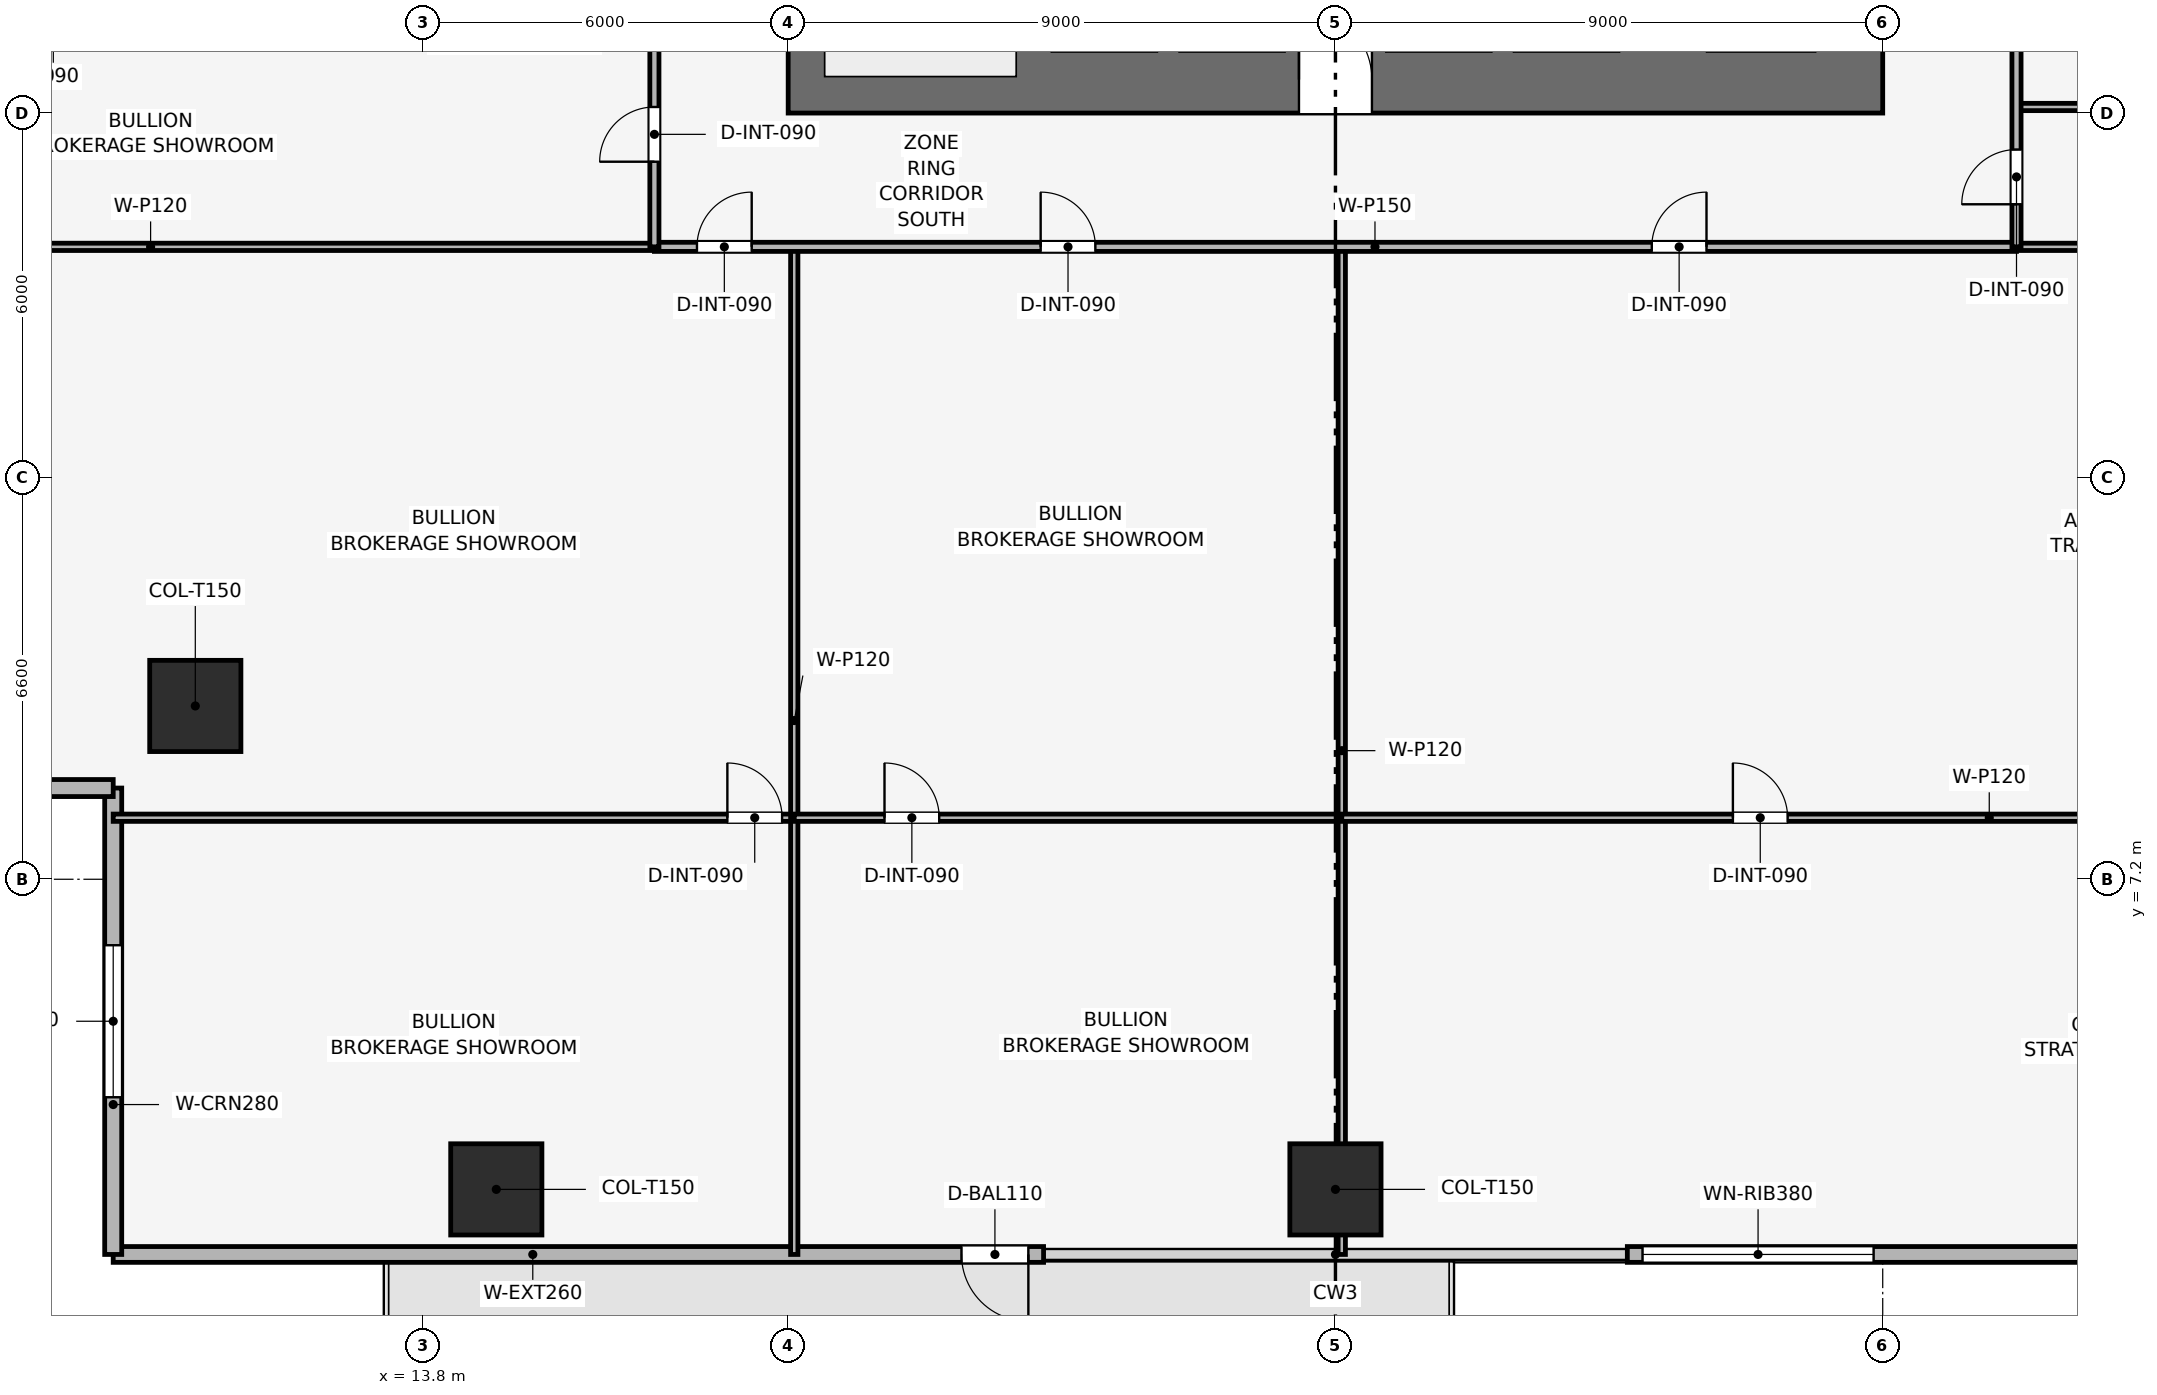
"""IFC4 building model, lengths in metres.
Left out: names, types, materials, properties, quantities, classifications, styles, units other than length and angle.
Written with IfcOpenShell. Run it as: python <this file> out.ifc"""

import sys

from ifc_helpers import new_model, si_unit, direction, frame, frame_2d, origin, origin_2d, place, context, subcontext, project, spatial, rectangle, extrude, element, fill, save


model = new_model("IFC4")
c1 = context("Model", 3, precision=1e-05, world=origin(), true_north=direction((0.0, 1.0)))
c2 = subcontext(c1, "Body", "Model", "MODEL_VIEW")
j1 = project(units=[si_unit("LENGTHUNIT", "METRE"), si_unit("PLANEANGLEUNIT", "RADIAN")], contexts=[c1])
p1 = place(None, origin())
s1 = spatial("IfcSite", under=j1, at=p1, CompositionType="ELEMENT")
p2 = place(p1, origin())
s2 = spatial("IfcBuilding", under=s1, at=p2, CompositionType="ELEMENT")
p3 = place(p2, frame((0.0, 0.0, 76.8)))
s3 = spatial("IfcBuildingStorey", under=s2, at=p3, CompositionType="ELEMENT", Elevation=76.8)
p4 = place(p3, frame((19.8, 20.35, 0.0), z_axis=(0.0, 0.0, 1.0), x_axis=(1.0, 0.0, 0.0)))
e1 = element("IfcWall", 1, at=p4, inside=s3, PredefinedType="SHEAR", context=c2, shape_type="SweptSolid", body=[
    extrude(rectangle(XDim=18.0, YDim=1.1, at=frame_2d((9.0, 0.0))), origin(), (0.0, 0.0, 1.0), 3.9),
])
p5 = place(p4, frame((8.4, 0.0, 0.0)))
e2 = element("IfcOpeningElement", 2, at=p5, cuts=e1, PredefinedType="OPENING", context=c2, shape_type="SweptSolid", body=[
    extrude(rectangle(XDim=1.2, YDim=2.2, at=frame_2d((0.6, 1.1))), frame((0.0, 0.56, 0.0), z_axis=(0.0, -1.0, 0.0), x_axis=(1.0, 0.0, 0.0)), (0.0, 0.0, 1.0), 1.12),
])
for number, where, z_axis, x_axis in (
    (3, (15.0, 2.1, 0.003), (0.0, 0.0, 1.0), (1.0, 0.0, 0.0)),
    (4, (28.8, 2.1, 0.003), (0.0, 0.0, 1.0), (1.0, 0.0, 0.0)),
    (5, (10.05, 10.05, 0.003), (0.0, 0.0, 1.0), (1.0, 0.0, 0.0)),
):
    element("IfcColumn", number, at=place(p3, frame(where, z_axis=z_axis, x_axis=x_axis)), inside=s3, PredefinedType="COLUMN", context=c2, shape_type="SweptSolid", body=[
        extrude(rectangle(XDim=1.5, YDim=1.5, at=origin_2d()), origin(), (0.0, 0.0, 1.0), 3.644),
    ])
p6 = place(p3, frame((48.9, 1.03, 0.0), z_axis=(0.0, 0.0, 1.0), x_axis=(-1.0, 0.0, 0.0)))
e6 = element("IfcWall", 6, at=p6, inside=s3, PredefinedType="SOLIDWALL", context=c2, shape_type="SweptSolid", body=[
    extrude(rectangle(XDim=15.3, YDim=0.26, at=frame_2d((7.65, 0.0))), origin(), (0.0, 0.0, 1.0), 3.65),
])
p7 = place(p6, frame((11.25, 0.0, 0.9)))
e7 = element("IfcOpeningElement", 7, at=p7, cuts=e6, PredefinedType="OPENING", context=c2, shape_type="SweptSolid", body=[
    extrude(rectangle(XDim=3.8, YDim=1.9, at=frame_2d((1.9, 0.95))), frame((0.0, 0.14, 0.0), z_axis=(0.0, -1.0, 0.0), x_axis=(1.0, 0.0, 0.0)), (0.0, 0.0, 1.0), 0.28),
])
p8 = place(p3, frame((24.0, 1.03, 0.0), z_axis=(0.0, 0.0, 1.0), x_axis=(-1.0, 0.0, 0.0)))
e8 = element("IfcWall", 8, at=p8, inside=s3, PredefinedType="SOLIDWALL", context=c2, shape_type="SweptSolid", body=[
    extrude(rectangle(XDim=15.3, YDim=0.26, at=frame_2d((7.65, 0.0))), origin(), (0.0, 0.0, 1.0), 3.65),
])
p9 = place(p8, frame((0.25, 0.0, 0.0)))
e9 = element("IfcOpeningElement", 9, at=p9, cuts=e8, PredefinedType="OPENING", context=c2, shape_type="SweptSolid", body=[
    extrude(rectangle(XDim=1.1, YDim=2.2, at=frame_2d((0.55, 1.1))), frame((0.0, 0.14, 0.0), z_axis=(0.0, -1.0, 0.0), x_axis=(1.0, 0.0, 0.0)), (0.0, 0.0, 1.0), 0.28),
])
p10 = place(p3, frame((8.7, 1.03, 0.0), z_axis=(0.0, 0.0, 1.0), x_axis=(0.0, 1.0, 0.0)))
e10 = element("IfcWall", 10, at=p10, inside=s3, PredefinedType="SOLIDWALL", context=c2, shape_type="SweptSolid", body=[
    extrude(rectangle(XDim=7.67, YDim=0.28, at=frame_2d((3.835, 0.0))), origin(), (0.0, 0.0, 1.0), 3.65),
])
p11 = place(p10, frame((2.585, 0.0, 0.9)))
e11 = element("IfcOpeningElement", 11, at=p11, cuts=e10, PredefinedType="OPENING", context=c2, shape_type="SweptSolid", body=[
    extrude(rectangle(XDim=2.5, YDim=1.9, at=frame_2d((1.25, 0.95))), frame((0.0, 0.15, 0.0), z_axis=(0.0, -1.0, 0.0), x_axis=(1.0, 0.0, 0.0)), (0.0, 0.0, 1.0), 0.3),
])
p12 = place(p3, frame((8.7, 8.7, 0.0), z_axis=(0.0, 0.0, 1.0), x_axis=(-1.0, 0.0, 0.0)))
e12 = element("IfcWall", 12, at=p12, inside=s3, PredefinedType="SOLIDWALL", context=c2, shape_type="SweptSolid", body=[
    extrude(rectangle(XDim=7.67, YDim=0.28, at=frame_2d((3.835, 0.0))), origin(), (0.0, 0.0, 1.0), 3.65),
])
p13 = place(p12, frame((2.585, 0.0, 0.9)))
e13 = element("IfcOpeningElement", 13, at=p13, cuts=e12, PredefinedType="OPENING", context=c2, shape_type="SweptSolid", body=[
    extrude(rectangle(XDim=2.5, YDim=1.9, at=frame_2d((1.25, 0.95))), frame((0.0, 0.15, 0.0), z_axis=(0.0, -1.0, 0.0), x_axis=(1.0, 0.0, 0.0)), (0.0, 0.0, 1.0), 0.3),
])
p14 = place(p3, frame((8.7, 8.212, 0.0), z_axis=(0.0, 0.0, 1.0), x_axis=(1.0, 0.0, 0.0)))
e14 = element("IfcWall", 14, at=p14, inside=s3, PredefinedType="PARTITIONING", context=c2, shape_type="SweptSolid", body=[
    extrude(rectangle(XDim=11.2, YDim=0.12, at=frame_2d((5.6, 0.0))), origin(), (0.0, 0.0, 1.0), 2.935),
])
p15 = place(p14, frame((10.1, 0.0, 0.0)))
e15 = element("IfcOpeningElement", 15, at=p15, cuts=e14, PredefinedType="OPENING", context=c2, shape_type="SweptSolid", body=[
    extrude(rectangle(XDim=0.9, YDim=2.1, at=frame_2d((0.45, 1.05))), frame((0.0, 0.07, 0.0), z_axis=(0.0, -1.0, 0.0), x_axis=(1.0, 0.0, 0.0)), (0.0, 0.0, 1.0), 0.14),
])
p16 = place(p3, frame((19.9, 1.03, 0.0), z_axis=(0.0, 0.0, 1.0), x_axis=(0.0, 1.0, 0.0)))
e16 = element("IfcWall", 16, at=p16, inside=s3, PredefinedType="PARTITIONING", context=c2, shape_type="SweptSolid", body=[
    extrude(rectangle(XDim=16.57, YDim=0.12, at=frame_2d((8.285, 0.0))), origin(), (0.0, 0.0, 1.0), 2.935),
])
p17 = place(p3, frame((19.9, 8.212, 0.0), z_axis=(0.0, 0.0, 1.0), x_axis=(1.0, 0.0, 0.0)))
e17 = element("IfcWall", 17, at=p17, inside=s3, PredefinedType="PARTITIONING", context=c2, shape_type="SweptSolid", body=[
    extrude(rectangle(XDim=9.004, YDim=0.12, at=frame_2d((4.502, 0.0))), origin(), (0.0, 0.0, 1.0), 3.085),
])
p18 = place(p17, frame((1.484, 0.0, 0.0)))
e18 = element("IfcOpeningElement", 18, at=p18, cuts=e17, PredefinedType="OPENING", context=c2, shape_type="SweptSolid", body=[
    extrude(rectangle(XDim=0.9, YDim=2.1, at=frame_2d((0.45, 1.05))), frame((0.0, 0.07, 0.0), z_axis=(0.0, -1.0, 0.0), x_axis=(1.0, 0.0, 0.0)), (0.0, 0.0, 1.0), 0.14),
])
p19 = place(p3, frame((28.904, 1.03, 0.0), z_axis=(0.0, 0.0, 1.0), x_axis=(0.0, 1.0, 0.0)))
e19 = element("IfcWall", 19, at=p19, inside=s3, PredefinedType="PARTITIONING", context=c2, shape_type="SweptSolid", body=[
    extrude(rectangle(XDim=16.57, YDim=0.12, at=frame_2d((8.285, 0.0))), origin(), (0.0, 0.0, 1.0), 3.085),
])
p20 = place(p3, frame((28.904, 8.212, 0.0), z_axis=(0.0, 0.0, 1.0), x_axis=(1.0, 0.0, 0.0)))
e20 = element("IfcWall", 20, at=p20, inside=s3, PredefinedType="PARTITIONING", context=c2, shape_type="SweptSolid", body=[
    extrude(rectangle(XDim=19.996, YDim=0.12, at=frame_2d((9.998, 0.0))), origin(), (0.0, 0.0, 1.0), 2.935),
])
p21 = place(p20, frame((6.432, 0.0, 0.0)))
e21 = element("IfcOpeningElement", 21, at=p21, cuts=e20, PredefinedType="OPENING", context=c2, shape_type="SweptSolid", body=[
    extrude(rectangle(XDim=0.9, YDim=2.1, at=frame_2d((0.45, 1.05))), frame((0.0, 0.07, 0.0), z_axis=(0.0, -1.0, 0.0), x_axis=(1.0, 0.0, 0.0)), (0.0, 0.0, 1.0), 0.14),
])
for number, where, z_axis, x_axis in (
    (22, (1.03, 17.6, 0.0), (0.0, 0.0, 1.0), (1.0, 0.0, 0.0)),
    (23, (40.0, 17.6, 0.0), (0.0, 0.0, 1.0), (1.0, 0.0, 0.0)),
    (24, (40.0, 19.9, 0.0), (0.0, 0.0, 1.0), (1.0, 0.0, 0.0)),
):
    element("IfcWall", number, at=place(p3, frame(where, z_axis=z_axis, x_axis=x_axis)), inside=s3, PredefinedType="PARTITIONING", context=c2, shape_type="SweptSolid", body=[
        extrude(rectangle(XDim=16.57, YDim=0.12, at=frame_2d((8.285, 0.0))), origin(), (0.0, 0.0, 1.0), 2.935),
    ])
p22 = place(p3, frame((17.6, 17.6, 0.0), z_axis=(0.0, 0.0, 1.0), x_axis=(1.0, 0.0, 0.0)))
e25 = element("IfcWall", 25, at=p22, inside=s3, PredefinedType="PARTITIONING", context=c2, shape_type="SweptSolid", body=[
    extrude(rectangle(XDim=22.4, YDim=0.15, at=frame_2d((11.2, 0.0))), origin(), (0.0, 0.0, 1.0), 3.085),
])
p23 = place(p22, frame((0.7, 0.0, 0.0)))
e26 = element("IfcOpeningElement", 26, at=p23, cuts=e25, PredefinedType="OPENING", context=c2, shape_type="SweptSolid", body=[
    extrude(rectangle(XDim=0.9, YDim=2.1, at=frame_2d((0.45, 1.05))), frame((0.0, 0.085, 0.0), z_axis=(0.0, -1.0, 0.0), x_axis=(1.0, 0.0, 0.0)), (0.0, 0.0, 1.0), 0.17),
])
p24 = place(p22, frame((6.352, 0.0, 0.0)))
e27 = element("IfcOpeningElement", 27, at=p24, cuts=e25, PredefinedType="OPENING", context=c2, shape_type="SweptSolid", body=[
    extrude(rectangle(XDim=0.9, YDim=2.1, at=frame_2d((0.45, 1.05))), frame((0.0, 0.085, 0.0), z_axis=(0.0, -1.0, 0.0), x_axis=(1.0, 0.0, 0.0)), (0.0, 0.0, 1.0), 0.17),
])
p25 = place(p22, frame((16.402, 0.0, 0.0)))
e28 = element("IfcOpeningElement", 28, at=p25, cuts=e25, PredefinedType="OPENING", context=c2, shape_type="SweptSolid", body=[
    extrude(rectangle(XDim=0.9, YDim=2.1, at=frame_2d((0.45, 1.05))), frame((0.0, 0.085, 0.0), z_axis=(0.0, -1.0, 0.0), x_axis=(1.0, 0.0, 0.0)), (0.0, 0.0, 1.0), 0.17),
])
p26 = place(p3, frame((17.6, 17.6, 0.0), z_axis=(0.0, 0.0, 1.0), x_axis=(0.0, 1.0, 0.0)))
e29 = element("IfcWall", 29, at=p26, inside=s3, PredefinedType="PARTITIONING", context=c2, shape_type="SweptSolid", body=[
    extrude(rectangle(XDim=22.4, YDim=0.15, at=frame_2d((11.2, 0.0))), origin(), (0.0, 0.0, 1.0), 3.085),
])
p27 = place(p26, frame((1.4, 0.0, 0.0)))
e30 = element("IfcOpeningElement", 30, at=p27, cuts=e29, PredefinedType="OPENING", context=c2, shape_type="SweptSolid", body=[
    extrude(rectangle(XDim=0.9, YDim=2.1, at=frame_2d((0.45, 1.05))), frame((0.0, 0.085, 0.0), z_axis=(0.0, -1.0, 0.0), x_axis=(1.0, 0.0, 0.0)), (0.0, 0.0, 1.0), 0.17),
])
p28 = place(p26, frame((4.65, 0.0, 0.0)))
e31 = element("IfcOpeningElement", 31, at=p28, cuts=e29, PredefinedType="OPENING", context=c2, shape_type="SweptSolid", body=[
    extrude(rectangle(XDim=0.9, YDim=2.1, at=frame_2d((0.45, 1.05))), frame((0.0, 0.085, 0.0), z_axis=(0.0, -1.0, 0.0), x_axis=(1.0, 0.0, 0.0)), (0.0, 0.0, 1.0), 0.17),
])
p29 = place(p26, frame((7.55, 0.0, 0.0)))
e32 = element("IfcOpeningElement", 32, at=p29, cuts=e29, PredefinedType="OPENING", context=c2, shape_type="SweptSolid", body=[
    extrude(rectangle(XDim=0.9, YDim=2.1, at=frame_2d((0.45, 1.05))), frame((0.0, 0.085, 0.0), z_axis=(0.0, -1.0, 0.0), x_axis=(1.0, 0.0, 0.0)), (0.0, 0.0, 1.0), 0.17),
])
p30 = place(p26, frame((10.3, 0.0, 0.0)))
e33 = element("IfcOpeningElement", 33, at=p30, cuts=e29, PredefinedType="OPENING", context=c2, shape_type="SweptSolid", body=[
    extrude(rectangle(XDim=0.95, YDim=2.1, at=frame_2d((0.475, 1.05))), frame((0.0, 0.085, 0.0), z_axis=(0.0, -1.0, 0.0), x_axis=(1.0, 0.0, 0.0)), (0.0, 0.0, 1.0), 0.17),
])
p31 = place(p26, frame((16.8, 0.0, 0.0)))
e34 = element("IfcOpeningElement", 34, at=p31, cuts=e29, PredefinedType="OPENING", context=c2, shape_type="SweptSolid", body=[
    extrude(rectangle(XDim=0.9, YDim=2.1, at=frame_2d((0.45, 1.05))), frame((0.0, 0.085, 0.0), z_axis=(0.0, -1.0, 0.0), x_axis=(1.0, 0.0, 0.0)), (0.0, 0.0, 1.0), 0.17),
])
p32 = place(p3, frame((40.0, 17.6, 0.0), z_axis=(0.0, 0.0, 1.0), x_axis=(0.0, 1.0, 0.0)))
e35 = element("IfcWall", 35, at=p32, inside=s3, PredefinedType="PARTITIONING", context=c2, shape_type="SweptSolid", body=[
    extrude(rectangle(XDim=22.4, YDim=0.15, at=frame_2d((11.2, 0.0))), origin(), (0.0, 0.0, 1.0), 3.085),
])
p33 = place(p32, frame((0.7, 0.0, 0.0)))
e36 = element("IfcOpeningElement", 36, at=p33, cuts=e35, PredefinedType="OPENING", context=c2, shape_type="SweptSolid", body=[
    extrude(rectangle(XDim=0.9, YDim=2.1, at=frame_2d((0.45, 1.05))), frame((0.0, 0.085, 0.0), z_axis=(0.0, -1.0, 0.0), x_axis=(1.0, 0.0, 0.0)), (0.0, 0.0, 1.0), 0.17),
])
p34 = place(p32, frame((4.927, 0.0, 0.0)))
e37 = element("IfcOpeningElement", 37, at=p34, cuts=e35, PredefinedType="OPENING", context=c2, shape_type="SweptSolid", body=[
    extrude(rectangle(XDim=0.9, YDim=2.1, at=frame_2d((0.45, 1.05))), frame((0.0, 0.085, 0.0), z_axis=(0.0, -1.0, 0.0), x_axis=(1.0, 0.0, 0.0)), (0.0, 0.0, 1.0), 0.17),
])
p35 = place(p32, frame((10.886, 0.0, 0.0)))
e38 = element("IfcOpeningElement", 38, at=p35, cuts=e35, PredefinedType="OPENING", context=c2, shape_type="SweptSolid", body=[
    extrude(rectangle(XDim=0.9, YDim=2.1, at=frame_2d((0.45, 1.05))), frame((0.0, 0.085, 0.0), z_axis=(0.0, -1.0, 0.0), x_axis=(1.0, 0.0, 0.0)), (0.0, 0.0, 1.0), 0.17),
])
p36 = place(p32, frame((17.859, 0.0, 0.0)))
e39 = element("IfcOpeningElement", 39, at=p36, cuts=e35, PredefinedType="OPENING", context=c2, shape_type="SweptSolid", body=[
    extrude(rectangle(XDim=0.9, YDim=2.1, at=frame_2d((0.45, 1.05))), frame((0.0, 0.085, 0.0), z_axis=(0.0, -1.0, 0.0), x_axis=(1.0, 0.0, 0.0)), (0.0, 0.0, 1.0), 0.17),
])
p37 = place(p9, origin())
e40 = element("IfcDoor", 40, at=p37, inside=s3, OperationType="SINGLE_SWING_LEFT", PredefinedType="DOOR", context=c2, shape_type="SweptSolid", body=[
    extrude(rectangle(XDim=1.1, YDim=2.2, at=frame_2d((0.55, 1.1))), frame((0.0, 0.025, 0.0), z_axis=(0.0, -1.0, 0.0), x_axis=(1.0, 0.0, 0.0)), (0.0, 0.0, 1.0), 0.05),
])
fill(e9, e40)
p38 = place(p7, origin())
e41 = element("IfcWindow", 41, at=p38, inside=s3, PartitioningType="SINGLE_PANEL", PredefinedType="WINDOW", context=c2, shape_type="SweptSolid", body=[
    extrude(rectangle(XDim=3.8, YDim=1.9, at=frame_2d((1.9, 0.95))), frame((0.0, 0.03, 0.0), z_axis=(0.0, -1.0, 0.0), x_axis=(1.0, 0.0, 0.0)), (0.0, 0.0, 1.0), 0.06),
])
fill(e7, e41)
p39 = place(p11, origin())
e42 = element("IfcWindow", 42, at=p39, inside=s3, PartitioningType="SINGLE_PANEL", PredefinedType="WINDOW", context=c2, shape_type="SweptSolid", body=[
    extrude(rectangle(XDim=2.5, YDim=1.9, at=frame_2d((1.25, 0.95))), frame((0.0, 0.03, 0.0), z_axis=(0.0, -1.0, 0.0), x_axis=(1.0, 0.0, 0.0)), (0.0, 0.0, 1.0), 0.06),
])
fill(e11, e42)
p40 = place(p15, origin())
e43 = element("IfcDoor", 43, at=p40, inside=s3, OperationType="SINGLE_SWING_LEFT", PredefinedType="DOOR", context=c2, shape_type="SweptSolid", body=[
    extrude(rectangle(XDim=0.9, YDim=2.1, at=frame_2d((0.45, 1.05))), frame((0.0, 0.025, 0.0), z_axis=(0.0, -1.0, 0.0), x_axis=(1.0, 0.0, 0.0)), (0.0, 0.0, 1.0), 0.05),
])
fill(e15, e43)
p41 = place(p18, origin())
e44 = element("IfcDoor", 44, at=p41, inside=s3, OperationType="SINGLE_SWING_LEFT", PredefinedType="DOOR", context=c2, shape_type="SweptSolid", body=[
    extrude(rectangle(XDim=0.9, YDim=2.1, at=frame_2d((0.45, 1.05))), frame((0.0, 0.025, 0.0), z_axis=(0.0, -1.0, 0.0), x_axis=(1.0, 0.0, 0.0)), (0.0, 0.0, 1.0), 0.05),
])
fill(e18, e44)
p42 = place(p21, origin())
e45 = element("IfcDoor", 45, at=p42, inside=s3, OperationType="SINGLE_SWING_LEFT", PredefinedType="DOOR", context=c2, shape_type="SweptSolid", body=[
    extrude(rectangle(XDim=0.9, YDim=2.1, at=frame_2d((0.45, 1.05))), frame((0.0, 0.025, 0.0), z_axis=(0.0, -1.0, 0.0), x_axis=(1.0, 0.0, 0.0)), (0.0, 0.0, 1.0), 0.05),
])
fill(e21, e45)
p43 = place(p23, origin())
e46 = element("IfcDoor", 46, at=p43, inside=s3, OperationType="SINGLE_SWING_RIGHT", PredefinedType="DOOR", context=c2, shape_type="SweptSolid", body=[
    extrude(rectangle(XDim=0.9, YDim=2.1, at=frame_2d((0.45, 1.05))), frame((0.0, 0.025, 0.0), z_axis=(0.0, -1.0, 0.0), x_axis=(1.0, 0.0, 0.0)), (0.0, 0.0, 1.0), 0.05),
])
fill(e26, e46)
p44 = place(p24, origin())
e47 = element("IfcDoor", 47, at=p44, inside=s3, OperationType="SINGLE_SWING_LEFT", PredefinedType="DOOR", context=c2, shape_type="SweptSolid", body=[
    extrude(rectangle(XDim=0.9, YDim=2.1, at=frame_2d((0.45, 1.05))), frame((0.0, 0.025, 0.0), z_axis=(0.0, -1.0, 0.0), x_axis=(1.0, 0.0, 0.0)), (0.0, 0.0, 1.0), 0.05),
])
fill(e27, e47)
p45 = place(p25, origin())
e48 = element("IfcDoor", 48, at=p45, inside=s3, OperationType="SINGLE_SWING_RIGHT", PredefinedType="DOOR", context=c2, shape_type="SweptSolid", body=[
    extrude(rectangle(XDim=0.9, YDim=2.1, at=frame_2d((0.45, 1.05))), frame((0.0, 0.025, 0.0), z_axis=(0.0, -1.0, 0.0), x_axis=(1.0, 0.0, 0.0)), (0.0, 0.0, 1.0), 0.05),
])
fill(e28, e48)
p46 = place(p27, origin())
e49 = element("IfcDoor", 49, at=p46, inside=s3, OperationType="SINGLE_SWING_LEFT", PredefinedType="DOOR", context=c2, shape_type="SweptSolid", body=[
    extrude(rectangle(XDim=0.9, YDim=2.1, at=frame_2d((0.45, 1.05))), frame((0.0, 0.025, 0.0), z_axis=(0.0, -1.0, 0.0), x_axis=(1.0, 0.0, 0.0)), (0.0, 0.0, 1.0), 0.05),
])
fill(e30, e49)
p47 = place(p33, origin())
e50 = element("IfcDoor", 50, at=p47, inside=s3, OperationType="SINGLE_SWING_LEFT", PredefinedType="DOOR", context=c2, shape_type="SweptSolid", body=[
    extrude(rectangle(XDim=0.9, YDim=2.1, at=frame_2d((0.45, 1.05))), frame((0.0, 0.025, 0.0), z_axis=(0.0, -1.0, 0.0), x_axis=(1.0, 0.0, 0.0)), (0.0, 0.0, 1.0), 0.05),
])
fill(e36, e50)
p48 = place(p5, origin())
e51 = element("IfcDoor", 51, at=p48, inside=s3, OperationType="SINGLE_SWING_LEFT", PredefinedType="DOOR", context=c2, shape_type="SweptSolid", body=[
    extrude(rectangle(XDim=1.2, YDim=2.2, at=frame_2d((0.6, 1.1))), frame((0.0, 0.025, 0.0), z_axis=(0.0, -1.0, 0.0), x_axis=(1.0, 0.0, 0.0)), (0.0, 0.0, 1.0), 0.05),
])
fill(e2, e51)
save(model, sys.argv[1])
